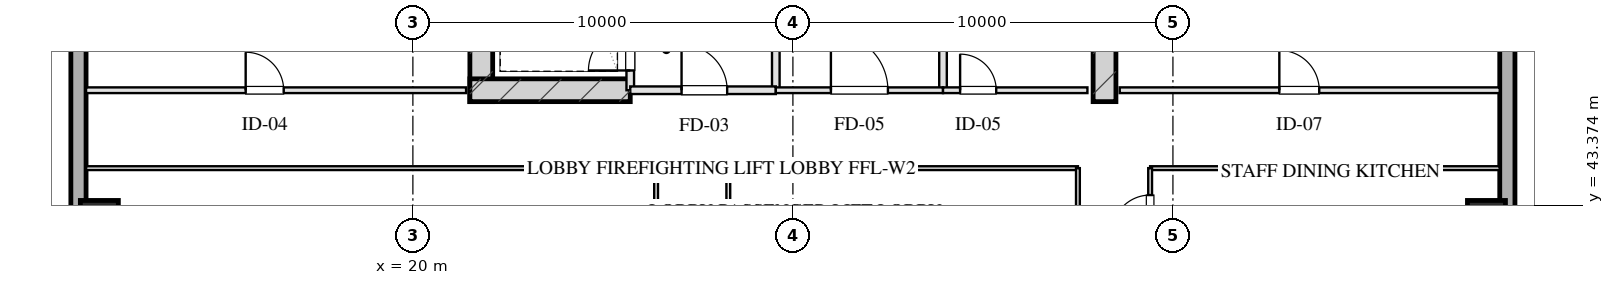
"""IFC4 building model, lengths in metres.
Left out: names, types, materials, properties, quantities, classifications, styles, units other than length and angle.
Written with IfcOpenShell. Run it as: python <this file> out.ifc"""

import sys

from ifc_helpers import new_model, si_unit, direction, frame, frame_2d, origin, origin_2d, place, context, subcontext, project, spatial, rectangle, hollow_rectangle, extrude, element, fill, save


model = new_model("IFC4")
c1 = context("Model", 3, precision=1e-05, world=origin(), true_north=direction((0.0, 1.0)))
c2 = subcontext(c1, "Body", "Model", "MODEL_VIEW")
j1 = project(units=[si_unit("LENGTHUNIT", "METRE"), si_unit("PLANEANGLEUNIT", "RADIAN")], contexts=[c1])
p1 = place(None, origin())
s1 = spatial("IfcSite", under=j1, at=p1, CompositionType="ELEMENT")
p2 = place(p1, origin())
s2 = spatial("IfcBuilding", under=s1, at=p2, CompositionType="ELEMENT")
p3 = place(p2, frame((0.0, 0.0, 134.55)))
s3 = spatial("IfcBuildingStorey", under=s2, at=p3, CompositionType="ELEMENT", Elevation=134.55)
for number, where, z_axis, x_axis in (
    (1, (21.8, 46.1, 0.0), (0.0, 0.0, 1.0), (0.0, 1.0, 0.0)),
    (2, (38.2, 46.1, 0.0), (0.0, 0.0, 1.0), (0.0, 1.0, 0.0)),
):
    element("IfcWall", number, at=place(p3, frame(where, z_axis=z_axis, x_axis=x_axis)), inside=s3, PredefinedType="SHEAR", context=c2, shape_type="SweptSolid", body=[
        extrude(rectangle(XDim=9.48, YDim=0.6, at=frame_2d((4.74, 0.0))), origin(), (0.0, 0.0, 1.0), 3.45),
    ])
p4 = place(p3, frame((21.5, 46.4, 0.0), z_axis=(0.0, 0.0, 1.0), x_axis=(1.0, 0.0, 0.0)))
e3 = element("IfcWall", 3, at=p4, inside=s3, PredefinedType="SHEAR", context=c2, shape_type="SweptSolid", body=[
    extrude(rectangle(XDim=4.22, YDim=0.6, at=frame_2d((2.11, 0.0))), origin(), (0.0, 0.0, 1.0), 3.45),
])
for number, where, z_axis, x_axis in (
    (4, (11.75, 43.0, 0.0), (0.0, 0.0, 1.0), (1.0, 0.0, 0.0)),
    (5, (48.25, 43.0, 0.0), (0.0, 0.0, 1.0), (1.0, 0.0, 0.0)),
):
    element("IfcColumn", number, at=place(p3, frame(where, z_axis=z_axis, x_axis=x_axis)), inside=s3, PredefinedType="COLUMN", context=c2, shape_type="SweptSolid", body=[
        extrude(hollow_rectangle(XDim=1.0, YDim=1.0, WallThickness=0.036, at=origin_2d()), origin(), (0.0, 0.0, 1.0), 3.451),
    ])
p5 = place(p3, frame((11.2, 9.0, 0.0), z_axis=(0.0, 0.0, 1.0), x_axis=(0.0, 1.0, 0.0)))
e6 = element("IfcWall", 6, at=p5, inside=s3, PredefinedType="SOLIDWALL", context=c2, shape_type="SweptSolid", body=[
    extrude(rectangle(XDim=50.0, YDim=0.4, at=frame_2d((25.0, 0.0))), origin(), (0.0, 0.0, 1.0), 2.55),
])
p6 = place(p5, frame((17.475, 0.0, 0.75)))
e7 = element("IfcOpeningElement", 7, at=p6, cuts=e6, PredefinedType="OPENING", context=c2, shape_type="SweptSolid", body=[
    extrude(rectangle(XDim=2.25, YDim=1.4, at=frame_2d((1.125, 0.7))), frame((0.0, 0.21, 0.0), z_axis=(0.0, -1.0, 0.0), x_axis=(1.0, 0.0, 0.0)), (0.0, 0.0, 1.0), 0.42),
])
p7 = place(p5, frame((21.275, 0.0, 0.75)))
e8 = element("IfcOpeningElement", 8, at=p7, cuts=e6, PredefinedType="OPENING", context=c2, shape_type="SweptSolid", body=[
    extrude(rectangle(XDim=2.25, YDim=1.4, at=frame_2d((1.125, 0.7))), frame((0.0, 0.21, 0.0), z_axis=(0.0, -1.0, 0.0), x_axis=(1.0, 0.0, 0.0)), (0.0, 0.0, 1.0), 0.42),
])
p8 = place(p5, frame((28.85, 0.0, 0.0)))
e9 = element("IfcOpeningElement", 9, at=p8, cuts=e6, PredefinedType="OPENING", context=c2, shape_type="SweptSolid", body=[
    extrude(rectangle(XDim=1.1, YDim=2.15, at=frame_2d((0.55, 1.075))), frame((0.0, 0.21, 0.0), z_axis=(0.0, -1.0, 0.0), x_axis=(1.0, 0.0, 0.0)), (0.0, 0.0, 1.0), 0.42),
])
p9 = place(p3, frame((48.8, 59.0, 0.0), z_axis=(0.0, 0.0, 1.0), x_axis=(0.0, -1.0, 0.0)))
e10 = element("IfcWall", 10, at=p9, inside=s3, PredefinedType="SOLIDWALL", context=c2, shape_type="SweptSolid", body=[
    extrude(rectangle(XDim=50.0, YDim=0.4, at=frame_2d((25.0, 0.0))), origin(), (0.0, 0.0, 1.0), 2.55),
])
p10 = place(p9, frame((21.436, 0.0, 0.0)))
e11 = element("IfcOpeningElement", 11, at=p10, cuts=e10, PredefinedType="OPENING", context=c2, shape_type="SweptSolid", body=[
    extrude(rectangle(XDim=1.1, YDim=2.15, at=frame_2d((0.55, 1.075))), frame((0.0, 0.21, 0.0), z_axis=(0.0, -1.0, 0.0), x_axis=(1.0, 0.0, 0.0)), (0.0, 0.0, 1.0), 0.42),
])
p11 = place(p3, frame((25.72, 46.4, 0.0), z_axis=(0.0, 0.0, 1.0), x_axis=(0.0, 1.0, 0.0)))
e12 = element("IfcWall", 12, at=p11, inside=s3, PredefinedType="PARTITIONING", context=c2, shape_type="SweptSolid", body=[
    extrude(rectangle(XDim=1.9, YDim=0.2, at=frame_2d((0.95, 0.0))), origin(), (0.0, 0.0, 1.0), 3.155),
])
p12 = place(p11, frame((0.52, 0.0, 0.0)))
e13 = element("IfcOpeningElement", 13, at=p12, cuts=e12, PredefinedType="OPENING", context=c2, shape_type="SweptSolid", body=[
    extrude(rectangle(XDim=1.1, YDim=2.05, at=frame_2d((0.55, 1.025))), frame((0.0, 0.11, 0.0), z_axis=(0.0, -1.0, 0.0), x_axis=(1.0, 0.0, 0.0)), (0.0, 0.0, 1.0), 0.22),
])
p13 = place(p3, frame((29.55, 46.4, 0.0), z_axis=(0.0, 0.0, 1.0), x_axis=(0.0, 1.0, 0.0)))
e14 = element("IfcWall", 14, at=p13, inside=s3, PredefinedType="PARTITIONING", context=c2, shape_type="SweptSolid", body=[
    extrude(rectangle(XDim=8.43, YDim=0.2, at=frame_2d((4.215, 0.0))), origin(), (0.0, 0.0, 1.0), 3.155),
])
p14 = place(p3, frame((25.72, 46.4, 0.0), z_axis=(0.0, 0.0, 1.0), x_axis=(1.0, 0.0, 0.0)))
e15 = element("IfcWall", 15, at=p14, inside=s3, PredefinedType="PARTITIONING", context=c2, shape_type="SweptSolid", body=[
    extrude(rectangle(XDim=3.83, YDim=0.2, at=frame_2d((1.915, 0.0))), origin(), (0.0, 0.0, 1.0), 3.155),
])
p15 = place(p14, frame((1.35, 0.0, 0.0)))
e16 = element("IfcOpeningElement", 16, at=p15, cuts=e15, PredefinedType="OPENING", context=c2, shape_type="SweptSolid", body=[
    extrude(rectangle(XDim=1.2, YDim=2.05, at=frame_2d((0.6, 1.025))), frame((0.0, 0.11, 0.0), z_axis=(0.0, -1.0, 0.0), x_axis=(1.0, 0.0, 0.0)), (0.0, 0.0, 1.0), 0.22),
])
p16 = place(p3, frame((33.95, 46.4, 0.0), z_axis=(0.0, 0.0, 1.0), x_axis=(0.0, 1.0, 0.0)))
e17 = element("IfcWall", 17, at=p16, inside=s3, PredefinedType="PARTITIONING", context=c2, shape_type="SweptSolid", body=[
    extrude(rectangle(XDim=8.43, YDim=0.2, at=frame_2d((4.215, 0.0))), origin(), (0.0, 0.0, 1.0), 3.155),
])
p17 = place(p3, frame((29.55, 46.4, 0.0), z_axis=(0.0, 0.0, 1.0), x_axis=(1.0, 0.0, 0.0)))
e18 = element("IfcWall", 18, at=p17, inside=s3, PredefinedType="PARTITIONING", context=c2, shape_type="SweptSolid", body=[
    extrude(rectangle(XDim=4.4, YDim=0.15, at=frame_2d((2.2, 0.0))), origin(), (0.0, 0.0, 1.0), 3.155),
])
p18 = place(p17, frame((1.45, 0.0, 0.0)))
e19 = element("IfcOpeningElement", 19, at=p18, cuts=e18, PredefinedType="OPENING", context=c2, shape_type="SweptSolid", body=[
    extrude(rectangle(XDim=1.5, YDim=2.05, at=frame_2d((0.75, 1.025))), frame((0.0, 0.085, 0.0), z_axis=(0.0, -1.0, 0.0), x_axis=(1.0, 0.0, 0.0)), (0.0, 0.0, 1.0), 0.17),
])
p19 = place(p3, frame((33.95, 46.4, 0.0), z_axis=(0.0, 0.0, 1.0), x_axis=(1.0, 0.0, 0.0)))
e20 = element("IfcWall", 20, at=p19, inside=s3, PredefinedType="PARTITIONING", context=c2, shape_type="SweptSolid", body=[
    extrude(rectangle(XDim=3.8, YDim=0.15, at=frame_2d((1.9, 0.0))), origin(), (0.0, 0.0, 1.0), 3.155),
])
p20 = place(p19, frame((0.45, 0.0, 0.0)))
e21 = element("IfcOpeningElement", 21, at=p20, cuts=e20, PredefinedType="OPENING", context=c2, shape_type="SweptSolid", body=[
    extrude(rectangle(XDim=0.95, YDim=2.05, at=frame_2d((0.475, 1.025))), frame((0.0, 0.085, 0.0), z_axis=(0.0, -1.0, 0.0), x_axis=(1.0, 0.0, 0.0)), (0.0, 0.0, 1.0), 0.17),
])
p21 = place(p3, frame((11.4, 46.4, 0.0), z_axis=(0.0, 0.0, 1.0), x_axis=(1.0, 0.0, 0.0)))
e22 = element("IfcWall", 22, at=p21, inside=s3, PredefinedType="PARTITIONING", context=c2, shape_type="SweptSolid", body=[
    extrude(rectangle(XDim=10.0, YDim=0.15, at=frame_2d((5.0, 0.0))), origin(), (0.0, 0.0, 1.0), 3.155),
])
p22 = place(p21, frame((4.2, 0.0, 0.0)))
e23 = element("IfcOpeningElement", 23, at=p22, cuts=e22, PredefinedType="OPENING", context=c2, shape_type="SweptSolid", body=[
    extrude(rectangle(XDim=1.0, YDim=2.05, at=frame_2d((0.5, 1.025))), frame((0.0, 0.085, 0.0), z_axis=(0.0, -1.0, 0.0), x_axis=(1.0, 0.0, 0.0)), (0.0, 0.0, 1.0), 0.17),
])
p23 = place(p3, frame((38.6, 46.4, 0.0), z_axis=(0.0, 0.0, 1.0), x_axis=(1.0, 0.0, 0.0)))
e24 = element("IfcWall", 24, at=p23, inside=s3, PredefinedType="PARTITIONING", context=c2, shape_type="SweptSolid", body=[
    extrude(rectangle(XDim=10.0, YDim=0.15, at=frame_2d((5.0, 0.0))), origin(), (0.0, 0.0, 1.0), 3.155),
])
p24 = place(p23, frame((4.2, 0.0, 0.0)))
e25 = element("IfcOpeningElement", 25, at=p24, cuts=e24, PredefinedType="OPENING", context=c2, shape_type="SweptSolid", body=[
    extrude(rectangle(XDim=1.05, YDim=2.05, at=frame_2d((0.525, 1.025))), frame((0.0, 0.085, 0.0), z_axis=(0.0, -1.0, 0.0), x_axis=(1.0, 0.0, 0.0)), (0.0, 0.0, 1.0), 0.17),
])
p25 = place(p3, frame((11.4, 44.35, 0.0), z_axis=(0.0, 0.0, 1.0), x_axis=(1.0, 0.0, 0.0)))
e26 = element("IfcWall", 26, at=p25, inside=s3, PredefinedType="MOVABLE", context=c2, shape_type="SweptSolid", body=[
    extrude(rectangle(XDim=15.0, YDim=0.1, at=frame_2d((7.5, 0.0))), origin(), (0.0, 0.0, 1.0), 3.155),
])
p26 = place(p3, frame((28.3, 44.35, 0.0), z_axis=(0.0, 0.0, 1.0), x_axis=(1.0, 0.0, 0.0)))
e27 = element("IfcWall", 27, at=p26, inside=s3, PredefinedType="MOVABLE", context=c2, shape_type="SweptSolid", body=[
    extrude(rectangle(XDim=9.2, YDim=0.1, at=frame_2d((4.6, 0.0))), origin(), (0.0, 0.0, 1.0), 3.155),
])
p27 = place(p3, frame((39.4, 44.35, 0.0), z_axis=(0.0, 0.0, 1.0), x_axis=(1.0, 0.0, 0.0)))
e28 = element("IfcWall", 28, at=p27, inside=s3, PredefinedType="MOVABLE", context=c2, shape_type="SweptSolid", body=[
    extrude(rectangle(XDim=9.2, YDim=0.1, at=frame_2d((4.6, 0.0))), origin(), (0.0, 0.0, 1.0), 3.155),
])
p28 = place(p3, frame((26.4, 23.65, 0.0), z_axis=(0.0, 0.0, 1.0), x_axis=(0.0, 1.0, 0.0)))
e29 = element("IfcWall", 29, at=p28, inside=s3, PredefinedType="MOVABLE", context=c2, shape_type="SweptSolid", body=[
    extrude(rectangle(XDim=20.7, YDim=0.1, at=frame_2d((10.35, 0.0))), origin(), (0.0, 0.0, 1.0), 3.155),
])
p29 = place(p28, frame((4.124, 0.0, 0.0)))
e30 = element("IfcOpeningElement", 30, at=p29, cuts=e29, PredefinedType="OPENING", context=c2, shape_type="SweptSolid", body=[
    extrude(rectangle(XDim=1.0, YDim=2.05, at=frame_2d((0.5, 1.025))), frame((0.0, 0.06, 0.0), z_axis=(0.0, -1.0, 0.0), x_axis=(1.0, 0.0, 0.0)), (0.0, 0.0, 1.0), 0.12),
])
p30 = place(p28, frame((14.473, 0.0, 0.0)))
e31 = element("IfcOpeningElement", 31, at=p30, cuts=e29, PredefinedType="OPENING", context=c2, shape_type="SweptSolid", body=[
    extrude(rectangle(XDim=1.0, YDim=2.05, at=frame_2d((0.5, 1.025))), frame((0.0, 0.06, 0.0), z_axis=(0.0, -1.0, 0.0), x_axis=(1.0, 0.0, 0.0)), (0.0, 0.0, 1.0), 0.12),
])
p31 = place(p3, frame((28.3, 23.65, 0.0), z_axis=(0.0, 0.0, 1.0), x_axis=(0.0, 1.0, 0.0)))
e32 = element("IfcWall", 32, at=p31, inside=s3, PredefinedType="MOVABLE", context=c2, shape_type="SweptSolid", body=[
    extrude(rectangle(XDim=20.7, YDim=0.1, at=frame_2d((10.35, 0.0))), origin(), (0.0, 0.0, 1.0), 3.155),
])
p32 = place(p31, frame((4.117, 0.0, 0.0)))
e33 = element("IfcOpeningElement", 33, at=p32, cuts=e32, PredefinedType="OPENING", context=c2, shape_type="SweptSolid", body=[
    extrude(rectangle(XDim=1.1, YDim=2.05, at=frame_2d((0.55, 1.025))), frame((0.0, 0.06, 0.0), z_axis=(0.0, -1.0, 0.0), x_axis=(1.0, 0.0, 0.0)), (0.0, 0.0, 1.0), 0.12),
])
p33 = place(p31, frame((14.347, 0.0, 0.0)))
e34 = element("IfcOpeningElement", 34, at=p33, cuts=e32, PredefinedType="OPENING", context=c2, shape_type="SweptSolid", body=[
    extrude(rectangle(XDim=1.1, YDim=2.05, at=frame_2d((0.55, 1.025))), frame((0.0, 0.06, 0.0), z_axis=(0.0, -1.0, 0.0), x_axis=(1.0, 0.0, 0.0)), (0.0, 0.0, 1.0), 0.12),
])
p34 = place(p3, frame((37.5, 23.65, 0.0), z_axis=(0.0, 0.0, 1.0), x_axis=(0.0, 1.0, 0.0)))
e35 = element("IfcWall", 35, at=p34, inside=s3, PredefinedType="MOVABLE", context=c2, shape_type="SweptSolid", body=[
    extrude(rectangle(XDim=20.7, YDim=0.1, at=frame_2d((10.35, 0.0))), origin(), (0.0, 0.0, 1.0), 3.155),
])
p35 = place(p3, frame((39.4, 23.65, 0.0), z_axis=(0.0, 0.0, 1.0), x_axis=(0.0, 1.0, 0.0)))
e36 = element("IfcWall", 36, at=p35, inside=s3, PredefinedType="MOVABLE", context=c2, shape_type="SweptSolid", body=[
    extrude(rectangle(XDim=20.7, YDim=0.1, at=frame_2d((10.35, 0.0))), origin(), (0.0, 0.0, 1.0), 3.155),
])
p36 = place(p35, frame((0.775, 0.0, 0.0)))
e37 = element("IfcOpeningElement", 37, at=p36, cuts=e36, PredefinedType="OPENING", context=c2, shape_type="SweptSolid", body=[
    extrude(rectangle(XDim=1.0, YDim=2.05, at=frame_2d((0.5, 1.025))), frame((0.0, 0.06, 0.0), z_axis=(0.0, -1.0, 0.0), x_axis=(1.0, 0.0, 0.0)), (0.0, 0.0, 1.0), 0.12),
])
p37 = place(p35, frame((3.95, 0.0, 0.0)))
e38 = element("IfcOpeningElement", 38, at=p37, cuts=e36, PredefinedType="OPENING", context=c2, shape_type="SweptSolid", body=[
    extrude(rectangle(XDim=1.0, YDim=2.05, at=frame_2d((0.5, 1.025))), frame((0.0, 0.06, 0.0), z_axis=(0.0, -1.0, 0.0), x_axis=(1.0, 0.0, 0.0)), (0.0, 0.0, 1.0), 0.12),
])
p38 = place(p35, frame((8.298, 0.0, 0.0)))
e39 = element("IfcOpeningElement", 39, at=p38, cuts=e36, PredefinedType="OPENING", context=c2, shape_type="SweptSolid", body=[
    extrude(rectangle(XDim=1.05, YDim=2.05, at=frame_2d((0.525, 1.025))), frame((0.0, 0.06, 0.0), z_axis=(0.0, -1.0, 0.0), x_axis=(1.0, 0.0, 0.0)), (0.0, 0.0, 1.0), 0.12),
])
p39 = place(p35, frame((12.712, 0.0, 0.0)))
e40 = element("IfcOpeningElement", 40, at=p39, cuts=e36, PredefinedType="OPENING", context=c2, shape_type="SweptSolid", body=[
    extrude(rectangle(XDim=1.0, YDim=2.05, at=frame_2d((0.5, 1.025))), frame((0.0, 0.06, 0.0), z_axis=(0.0, -1.0, 0.0), x_axis=(1.0, 0.0, 0.0)), (0.0, 0.0, 1.0), 0.12),
])
p40 = place(p35, frame((16.231, 0.0, 0.0)))
e41 = element("IfcOpeningElement", 41, at=p40, cuts=e36, PredefinedType="OPENING", context=c2, shape_type="SweptSolid", body=[
    extrude(rectangle(XDim=1.0, YDim=2.05, at=frame_2d((0.5, 1.025))), frame((0.0, 0.06, 0.0), z_axis=(0.0, -1.0, 0.0), x_axis=(1.0, 0.0, 0.0)), (0.0, 0.0, 1.0), 0.12),
])
p41 = place(p35, frame((18.992, 0.0, 0.0)))
e42 = element("IfcOpeningElement", 42, at=p41, cuts=e36, PredefinedType="OPENING", context=c2, shape_type="SweptSolid", body=[
    extrude(rectangle(XDim=1.0, YDim=2.05, at=frame_2d((0.5, 1.025))), frame((0.0, 0.06, 0.0), z_axis=(0.0, -1.0, 0.0), x_axis=(1.0, 0.0, 0.0)), (0.0, 0.0, 1.0), 0.12),
])
p42 = place(p12, origin())
e43 = element("IfcDoor", 43, at=p42, inside=s3, OperationType="SINGLE_SWING_LEFT", PredefinedType="DOOR", context=c2, shape_type="SweptSolid", body=[
    extrude(rectangle(XDim=1.1, YDim=2.05, at=frame_2d((0.55, 1.025))), frame((0.0, 0.025, 0.0), z_axis=(0.0, -1.0, 0.0), x_axis=(1.0, 0.0, 0.0)), (0.0, 0.0, 1.0), 0.05),
])
fill(e13, e43)
p43 = place(p15, origin())
e44 = element("IfcDoor", 44, at=p43, inside=s3, OperationType="SINGLE_SWING_LEFT", PredefinedType="DOOR", context=c2, shape_type="SweptSolid", body=[
    extrude(rectangle(XDim=1.2, YDim=2.05, at=frame_2d((0.6, 1.025))), frame((0.0, 0.025, 0.0), z_axis=(0.0, -1.0, 0.0), x_axis=(1.0, 0.0, 0.0)), (0.0, 0.0, 1.0), 0.05),
])
fill(e16, e44)
p44 = place(p18, origin())
e45 = element("IfcDoor", 45, at=p44, inside=s3, OperationType="SINGLE_SWING_LEFT", PredefinedType="DOOR", context=c2, shape_type="SweptSolid", body=[
    extrude(rectangle(XDim=1.5, YDim=2.05, at=frame_2d((0.75, 1.025))), frame((0.0, 0.025, 0.0), z_axis=(0.0, -1.0, 0.0), x_axis=(1.0, 0.0, 0.0)), (0.0, 0.0, 1.0), 0.05),
])
fill(e19, e45)
p45 = place(p20, origin())
e46 = element("IfcDoor", 46, at=p45, inside=s3, OperationType="SINGLE_SWING_LEFT", PredefinedType="DOOR", context=c2, shape_type="SweptSolid", body=[
    extrude(rectangle(XDim=0.95, YDim=2.05, at=frame_2d((0.475, 1.025))), frame((0.0, 0.025, 0.0), z_axis=(0.0, -1.0, 0.0), x_axis=(1.0, 0.0, 0.0)), (0.0, 0.0, 1.0), 0.05),
])
fill(e21, e46)
p46 = place(p22, origin())
e47 = element("IfcDoor", 47, at=p46, inside=s3, OperationType="SINGLE_SWING_LEFT", PredefinedType="DOOR", context=c2, shape_type="SweptSolid", body=[
    extrude(rectangle(XDim=1.0, YDim=2.05, at=frame_2d((0.5, 1.025))), frame((0.0, 0.025, 0.0), z_axis=(0.0, -1.0, 0.0), x_axis=(1.0, 0.0, 0.0)), (0.0, 0.0, 1.0), 0.05),
])
fill(e23, e47)
p47 = place(p24, origin())
e48 = element("IfcDoor", 48, at=p47, inside=s3, OperationType="SINGLE_SWING_LEFT", PredefinedType="DOOR", context=c2, shape_type="SweptSolid", body=[
    extrude(rectangle(XDim=1.05, YDim=2.05, at=frame_2d((0.525, 1.025))), frame((0.0, 0.025, 0.0), z_axis=(0.0, -1.0, 0.0), x_axis=(1.0, 0.0, 0.0)), (0.0, 0.0, 1.0), 0.05),
])
fill(e25, e48)
p48 = place(p41, origin())
e49 = element("IfcDoor", 49, at=p48, inside=s3, OperationType="SINGLE_SWING_LEFT", PredefinedType="DOOR", context=c2, shape_type="SweptSolid", body=[
    extrude(rectangle(XDim=1.0, YDim=2.05, at=frame_2d((0.5, 1.025))), frame((0.0, 0.025, 0.0), z_axis=(0.0, -1.0, 0.0), x_axis=(1.0, 0.0, 0.0)), (0.0, 0.0, 1.0), 0.05),
])
fill(e42, e49)
save(model, sys.argv[1])
